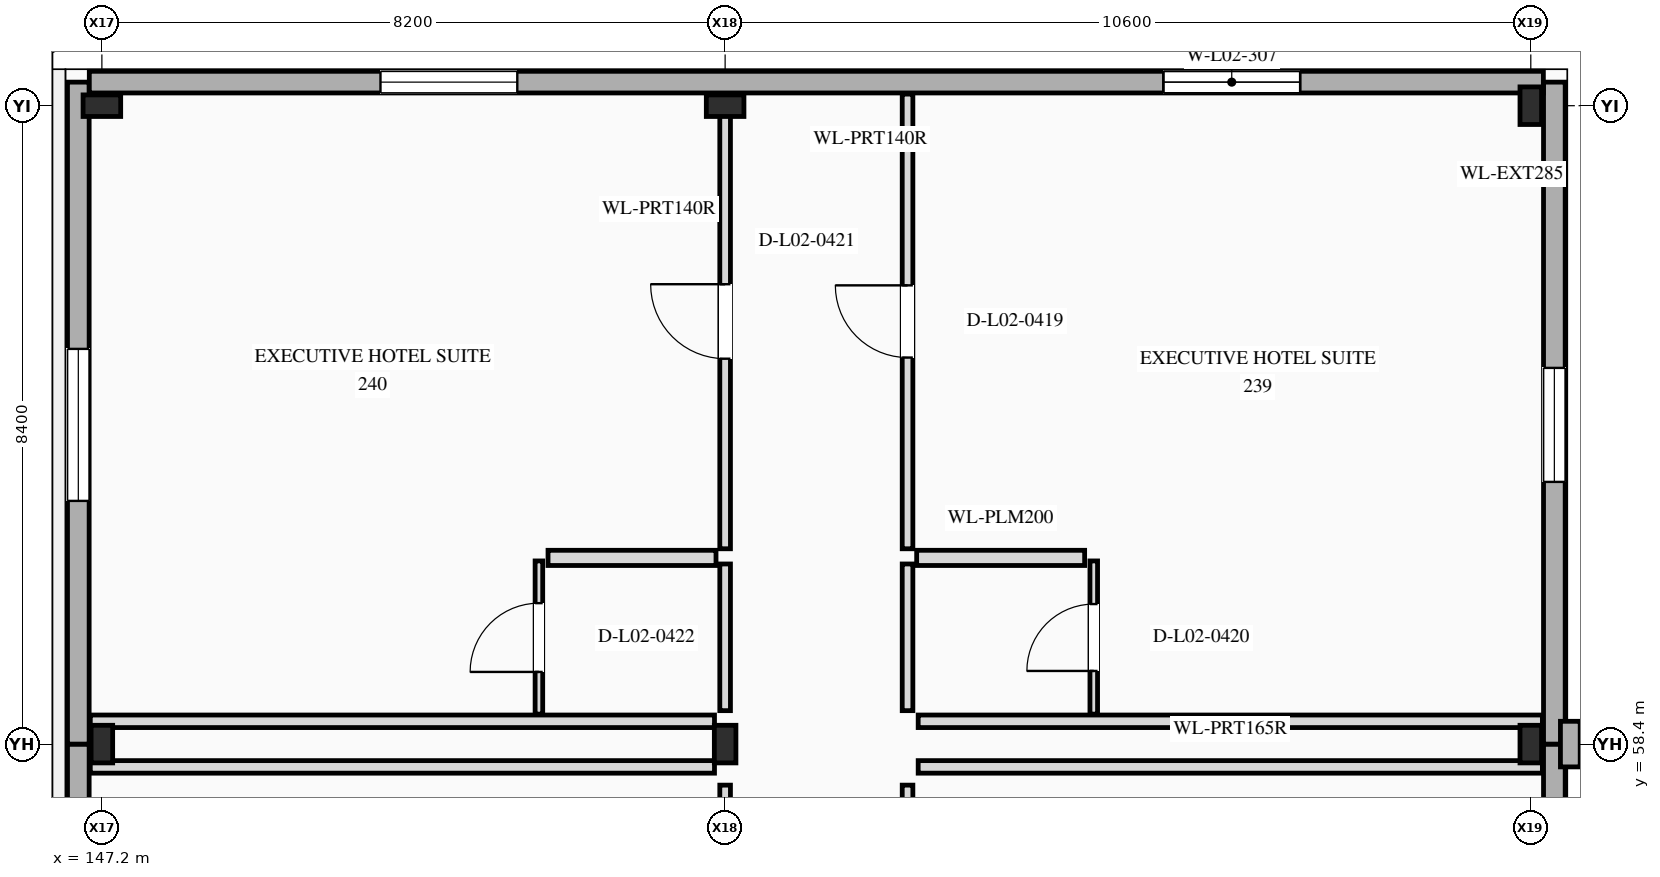
"""IFC4 building model, lengths in metres.
Left out: names, types, materials, properties, quantities, classifications, styles, units other than length and angle.
Written with IfcOpenShell. Run it as: python <this file> out.ifc"""

import sys

from ifc_helpers import new_model, si_unit, direction, frame, frame_2d, origin, origin_2d, place, context, subcontext, project, spatial, rectangle, i_section, extrude, element, fill, save


model = new_model("IFC4")
c1 = context("Model", 3, precision=1e-05, world=origin(), true_north=direction((0.0, 1.0)))
c2 = subcontext(c1, "Body", "Model", "MODEL_VIEW")
j1 = project(units=[si_unit("LENGTHUNIT", "METRE"), si_unit("PLANEANGLEUNIT", "RADIAN")], contexts=[c1])
p1 = place(None, origin())
s1 = spatial("IfcSite", under=j1, at=p1, CompositionType="ELEMENT")
p2 = place(p1, origin())
s2 = spatial("IfcBuilding", under=s1, at=p2, CompositionType="ELEMENT")
p3 = place(p2, frame((0.0, 0.0, 10.8)))
s3 = spatial("IfcBuildingStorey", under=s2, at=p3, CompositionType="ELEMENT", Elevation=10.8)
for number, where, z_axis, x_axis in (
    (1, (147.2, 58.4, 0.0), (0.0, 0.0, 1.0), (1.0, 0.0, 0.0)),
    (2, (147.2, 66.8, 0.0), (0.0, 0.0, 1.0), (0.0, 1.0, 0.0)),
    (3, (155.4, 58.4, 0.0), (0.0, 0.0, 1.0), (1.0, 0.0, 0.0)),
    (4, (155.4, 66.8, 0.0), (0.0, 0.0, 1.0), (0.0, 1.0, 0.0)),
    (5, (166.0, 58.4, 0.0), (0.0, 0.0, 1.0), (1.0, 0.0, 0.0)),
    (6, (166.0, 66.8, 0.0), (0.0, 0.0, 1.0), (1.0, 0.0, 0.0)),
):
    element("IfcColumn", number, at=place(p3, frame(where, z_axis=z_axis, x_axis=x_axis)), inside=s3, PredefinedType="COLUMN", context=c2, shape_type="SweptSolid", body=[
        extrude(i_section(OverallWidth=0.284, OverallDepth=0.495, WebThickness=0.019, FlangeThickness=0.033, at=origin_2d()), origin(), (0.0, 0.0, 1.0), 4.8),
    ])
p4 = place(p3, frame((166.31, 50.0, 0.0), z_axis=(0.0, 0.0, 1.0), x_axis=(0.0, 1.0, 0.0)))
e7 = element("IfcWall", 7, at=p4, inside=s3, PredefinedType="STANDARD", context=c2, shape_type="SweptSolid", body=[
    extrude(rectangle(XDim=8.4, YDim=0.285, at=frame_2d((4.2, 0.0))), origin(), (0.0, 0.0, 1.0), 4.8),
])
p5 = place(p4, frame((3.2, 0.0, 0.85)))
e8 = element("IfcOpeningElement", 8, at=p5, cuts=e7, PredefinedType="OPENING", context=c2, shape_type="SweptSolid", body=[
    extrude(rectangle(XDim=2.0, YDim=1.65, at=frame_2d((1.0, 0.825))), frame((0.0, 0.152, 0.0), z_axis=(0.0, -1.0, 0.0), x_axis=(1.0, 0.0, 0.0)), (0.0, 0.0, 1.0), 0.305),
])
p6 = place(p3, frame((166.31, 58.4, 0.0), z_axis=(0.0, 0.0, 1.0), x_axis=(0.0, 1.0, 0.0)))
e9 = element("IfcWall", 9, at=p6, inside=s3, PredefinedType="STANDARD", context=c2, shape_type="SweptSolid", body=[
    extrude(rectangle(XDim=8.71, YDim=0.285, at=frame_2d((4.355, 0.0))), origin(), (0.0, 0.0, 1.0), 4.8),
])
p7 = place(p6, frame((3.45, 0.0, 0.85)))
e10 = element("IfcOpeningElement", 10, at=p7, cuts=e9, PredefinedType="OPENING", context=c2, shape_type="SweptSolid", body=[
    extrude(rectangle(XDim=1.5, YDim=1.7, at=frame_2d((0.75, 0.85))), frame((0.0, 0.152, 0.0), z_axis=(0.0, -1.0, 0.0), x_axis=(1.0, 0.0, 0.0)), (0.0, 0.0, 1.0), 0.305),
])
p8 = place(p3, frame((166.52, 58.1, 0.0), z_axis=(0.0, 0.0, 1.0), x_axis=(0.0, 1.0, 0.0)))
e11 = element("IfcWall", 11, at=p8, inside=s3, PredefinedType="ELEMENTEDWALL", context=c2, shape_type="SweptSolid", body=[
    extrude(rectangle(XDim=0.6, YDim=0.26, at=frame_2d((0.3, 0.0))), origin(), (0.0, 0.0, 1.0), 4.8),
])
p9 = place(p3, frame((146.89, 50.0, 0.0), z_axis=(0.0, 0.0, 1.0), x_axis=(0.0, 1.0, 0.0)))
e12 = element("IfcWall", 12, at=p9, inside=s3, PredefinedType="STANDARD", context=c2, shape_type="SweptSolid", body=[
    extrude(rectangle(XDim=8.4, YDim=0.285, at=frame_2d((4.2, 0.0))), origin(), (0.0, 0.0, 1.0), 4.8),
])
p10 = place(p9, frame((3.225, 0.0, 0.85)))
e13 = element("IfcOpeningElement", 13, at=p10, cuts=e12, PredefinedType="OPENING", context=c2, shape_type="SweptSolid", body=[
    extrude(rectangle(XDim=1.95, YDim=1.85, at=frame_2d((0.975, 0.925))), frame((0.0, 0.152, 0.0), z_axis=(0.0, -1.0, 0.0), x_axis=(1.0, 0.0, 0.0)), (0.0, 0.0, 1.0), 0.305),
])
p11 = place(p3, frame((146.89, 58.4, 0.0), z_axis=(0.0, 0.0, 1.0), x_axis=(0.0, 1.0, 0.0)))
e14 = element("IfcWall", 14, at=p11, inside=s3, PredefinedType="STANDARD", context=c2, shape_type="SweptSolid", body=[
    extrude(rectangle(XDim=8.71, YDim=0.285, at=frame_2d((4.355, 0.0))), origin(), (0.0, 0.0, 1.0), 4.8),
])
p12 = place(p11, frame((3.2, 0.0, 0.85)))
e15 = element("IfcOpeningElement", 15, at=p12, cuts=e14, PredefinedType="OPENING", context=c2, shape_type="SweptSolid", body=[
    extrude(rectangle(XDim=2.0, YDim=1.65, at=frame_2d((1.0, 0.825))), frame((0.0, 0.152, 0.0), z_axis=(0.0, -1.0, 0.0), x_axis=(1.0, 0.0, 0.0)), (0.0, 0.0, 1.0), 0.305),
])
p13 = place(p3, frame((166.166, 67.11, 0.0), z_axis=(0.0, 0.0, 1.0), x_axis=(-1.0, 0.0, 0.0)))
e16 = element("IfcWall", 16, at=p13, inside=s3, PredefinedType="STANDARD", context=c2, shape_type="SweptSolid", body=[
    extrude(rectangle(XDim=19.131, YDim=0.285, at=frame_2d((9.565, 0.0))), origin(), (0.0, 0.0, 1.0), 4.8),
])
p14 = place(p13, frame((3.2, 0.0, 0.88)))
e17 = element("IfcOpeningElement", 17, at=p14, cuts=e16, PredefinedType="OPENING", context=c2, shape_type="SweptSolid", body=[
    extrude(rectangle(XDim=1.8, YDim=1.8, at=frame_2d((0.9, 0.9))), frame((0.0, 0.152, 0.0), z_axis=(0.0, -1.0, 0.0), x_axis=(1.0, 0.0, 0.0)), (0.0, 0.0, 1.0), 0.305),
])
p15 = place(p13, frame((13.5, 0.0, 0.88)))
e18 = element("IfcOpeningElement", 18, at=p15, cuts=e16, PredefinedType="OPENING", context=c2, shape_type="SweptSolid", body=[
    extrude(rectangle(XDim=1.8, YDim=1.8, at=frame_2d((0.9, 0.9))), frame((0.0, 0.152, 0.0), z_axis=(0.0, -1.0, 0.0), x_axis=(1.0, 0.0, 0.0)), (0.0, 0.0, 1.0), 0.305),
])
p16 = place(p3, frame((157.8, 52.57, 0.0), z_axis=(0.0, 0.0, 1.0), x_axis=(0.0, 1.0, 0.0)))
e19 = element("IfcWall", 19, at=p16, inside=s3, PredefinedType="PARTITIONING", context=c2, shape_type="SweptSolid", body=[
    extrude(rectangle(XDim=5.29, YDim=0.14, at=frame_2d((2.645, 0.0))), origin(), (0.0, 0.0, 1.0), 4.475),
])
p17 = place(p16, frame((2.11, 0.0, 0.0)))
e20 = element("IfcOpeningElement", 20, at=p17, cuts=e19, PredefinedType="OPENING", context=c2, shape_type="SweptSolid", body=[
    extrude(rectangle(XDim=1.07, YDim=2.25, at=frame_2d((0.535, 1.125))), frame((0.0, 0.08, 0.0), z_axis=(0.0, -1.0, 0.0), x_axis=(1.0, 0.0, 0.0)), (0.0, 0.0, 1.0), 0.16),
])
p18 = place(p3, frame((157.94, 58.1, 0.0), z_axis=(0.0, 0.0, 1.0), x_axis=(1.0, 0.0, 0.0)))
e21 = element("IfcWall", 21, at=p18, inside=s3, PredefinedType="PARTITIONING", context=c2, shape_type="SweptSolid", body=[
    extrude(rectangle(XDim=8.213, YDim=0.165, at=frame_2d((4.106, 0.0))), origin(), (0.0, 0.0, 1.0), 3.865),
])
p19 = place(p3, frame((155.4, 52.57, 0.0), z_axis=(0.0, 0.0, 1.0), x_axis=(0.0, 1.0, 0.0)))
e22 = element("IfcWall", 22, at=p19, inside=s3, PredefinedType="PARTITIONING", context=c2, shape_type="SweptSolid", body=[
    extrude(rectangle(XDim=5.29, YDim=0.14, at=frame_2d((2.645, 0.0))), origin(), (0.0, 0.0, 1.0), 3.865),
])
p20 = place(p19, frame((2.185, 0.0, 0.0)))
e23 = element("IfcOpeningElement", 23, at=p20, cuts=e22, PredefinedType="OPENING", context=c2, shape_type="SweptSolid", body=[
    extrude(rectangle(XDim=0.92, YDim=2.3, at=frame_2d((0.46, 1.15))), frame((0.0, 0.08, 0.0), z_axis=(0.0, -1.0, 0.0), x_axis=(1.0, 0.0, 0.0)), (0.0, 0.0, 1.0), 0.16),
])
p21 = place(p3, frame((147.048, 58.1, 0.0), z_axis=(0.0, 0.0, 1.0), x_axis=(1.0, 0.0, 0.0)))
e24 = element("IfcWall", 24, at=p21, inside=s3, PredefinedType="PARTITIONING", context=c2, shape_type="SweptSolid", body=[
    extrude(rectangle(XDim=8.212, YDim=0.165, at=frame_2d((4.106, 0.0))), origin(), (0.0, 0.0, 1.0), 3.888),
])
p22 = place(p3, frame((157.8, 58.84, 0.0), z_axis=(0.0, 0.0, 1.0), x_axis=(0.0, 1.0, 0.0)))
e25 = element("IfcWall", 25, at=p22, inside=s3, PredefinedType="PARTITIONING", context=c2, shape_type="SweptSolid", body=[
    extrude(rectangle(XDim=1.93, YDim=0.14, at=frame_2d((0.965, 0.0))), origin(), (0.0, 0.0, 1.0), 4.033),
])
p23 = place(p3, frame((157.8, 60.97, 0.0), z_axis=(0.0, 0.0, 1.0), x_axis=(0.0, 1.0, 0.0)))
e26 = element("IfcWall", 26, at=p23, inside=s3, PredefinedType="PARTITIONING", context=c2, shape_type="SweptSolid", body=[
    extrude(rectangle(XDim=5.982, YDim=0.14, at=frame_2d((2.991, 0.0))), origin(), (0.0, 0.0, 1.0), 3.888),
])
p24 = place(p23, frame((2.516, 0.0, 0.0)))
e27 = element("IfcOpeningElement", 27, at=p24, cuts=e26, PredefinedType="OPENING", context=c2, shape_type="SweptSolid", body=[
    extrude(rectangle(XDim=0.95, YDim=2.3, at=frame_2d((0.475, 1.15))), frame((0.0, 0.08, 0.0), z_axis=(0.0, -1.0, 0.0), x_axis=(1.0, 0.0, 0.0)), (0.0, 0.0, 1.0), 0.16),
])
p25 = place(p3, frame((157.94, 58.7, 0.0), z_axis=(0.0, 0.0, 1.0), x_axis=(1.0, 0.0, 0.0)))
e28 = element("IfcWall", 28, at=p25, inside=s3, PredefinedType="PARTITIONING", context=c2, shape_type="SweptSolid", body=[
    extrude(rectangle(XDim=8.213, YDim=0.165, at=frame_2d((4.106, 0.0))), origin(), (0.0, 0.0, 1.0), 3.865),
])
p26 = place(p3, frame((157.92, 60.85, 0.0), z_axis=(0.0, 0.0, 1.0), x_axis=(1.0, 0.0, 0.0)))
e29 = element("IfcWall", 29, at=p26, inside=s3, PredefinedType="PLUMBINGWALL", context=c2, shape_type="SweptSolid", body=[
    extrude(rectangle(XDim=2.21, YDim=0.2, at=frame_2d((1.105, 0.0))), origin(), (0.0, 0.0, 1.0), 4.475),
])
p27 = place(p3, frame((160.25, 58.794, 0.0), z_axis=(0.0, 0.0, 1.0), x_axis=(0.0, 1.0, 0.0)))
e30 = element("IfcWall", 30, at=p27, inside=s3, PredefinedType="PARTITIONING", context=c2, shape_type="SweptSolid", body=[
    extrude(rectangle(XDim=2.016, YDim=0.1, at=frame_2d((1.008, 0.0))), origin(), (0.0, 0.0, 1.0), 4.033),
])
p28 = place(p27, frame((0.568, 0.0, 0.0)))
e31 = element("IfcOpeningElement", 31, at=p28, cuts=e30, PredefinedType="OPENING", context=c2, shape_type="SweptSolid", body=[
    extrude(rectangle(XDim=0.88, YDim=2.1, at=frame_2d((0.44, 1.05))), frame((0.0, 0.06, 0.0), z_axis=(0.0, -1.0, 0.0), x_axis=(1.0, 0.0, 0.0)), (0.0, 0.0, 1.0), 0.12),
])
p29 = place(p3, frame((155.4, 58.84, 0.0), z_axis=(0.0, 0.0, 1.0), x_axis=(0.0, 1.0, 0.0)))
e32 = element("IfcWall", 32, at=p29, inside=s3, PredefinedType="PARTITIONING", context=c2, shape_type="SweptSolid", body=[
    extrude(rectangle(XDim=1.93, YDim=0.14, at=frame_2d((0.965, 0.0))), origin(), (0.0, 0.0, 1.0), 3.949),
])
p30 = place(p3, frame((155.4, 60.97, 0.0), z_axis=(0.0, 0.0, 1.0), x_axis=(0.0, 1.0, 0.0)))
e33 = element("IfcWall", 33, at=p30, inside=s3, PredefinedType="PARTITIONING", context=c2, shape_type="SweptSolid", body=[
    extrude(rectangle(XDim=5.982, YDim=0.14, at=frame_2d((2.991, 0.0))), origin(), (0.0, 0.0, 1.0), 3.888),
])
p31 = place(p30, frame((2.501, 0.0, 0.0)))
e34 = element("IfcOpeningElement", 34, at=p31, cuts=e33, PredefinedType="OPENING", context=c2, shape_type="SweptSolid", body=[
    extrude(rectangle(XDim=0.98, YDim=2.35, at=frame_2d((0.49, 1.175))), frame((0.0, 0.08, 0.0), z_axis=(0.0, -1.0, 0.0), x_axis=(1.0, 0.0, 0.0)), (0.0, 0.0, 1.0), 0.16),
])
p32 = place(p3, frame((147.048, 58.7, 0.0), z_axis=(0.0, 0.0, 1.0), x_axis=(1.0, 0.0, 0.0)))
e35 = element("IfcWall", 35, at=p32, inside=s3, PredefinedType="PARTITIONING", context=c2, shape_type="SweptSolid", body=[
    extrude(rectangle(XDim=8.212, YDim=0.165, at=frame_2d((4.106, 0.0))), origin(), (0.0, 0.0, 1.0), 3.888),
])
p33 = place(p3, frame((153.07, 60.85, 0.0), z_axis=(0.0, 0.0, 1.0), x_axis=(1.0, 0.0, 0.0)))
e36 = element("IfcWall", 36, at=p33, inside=s3, PredefinedType="PLUMBINGWALL", context=c2, shape_type="SweptSolid", body=[
    extrude(rectangle(XDim=2.21, YDim=0.2, at=frame_2d((1.105, 0.0))), origin(), (0.0, 0.0, 1.0), 4.475),
])
p34 = place(p3, frame((152.95, 58.794, 0.0), z_axis=(0.0, 0.0, 1.0), x_axis=(0.0, 1.0, 0.0)))
e37 = element("IfcWall", 37, at=p34, inside=s3, PredefinedType="PARTITIONING", context=c2, shape_type="SweptSolid", body=[
    extrude(rectangle(XDim=2.016, YDim=0.1, at=frame_2d((1.008, 0.0))), origin(), (0.0, 0.0, 1.0), 4.083),
])
p35 = place(p34, frame((0.555, 0.0, 0.0)))
e38 = element("IfcOpeningElement", 38, at=p35, cuts=e37, PredefinedType="OPENING", context=c2, shape_type="SweptSolid", body=[
    extrude(rectangle(XDim=0.905, YDim=2.1, at=frame_2d((0.453, 1.05))), frame((0.0, 0.06, 0.0), z_axis=(0.0, -1.0, 0.0), x_axis=(1.0, 0.0, 0.0)), (0.0, 0.0, 1.0), 0.12),
])
p36 = place(p7, origin())
e39 = element("IfcWindow", 39, at=p36, inside=s3, PartitioningType="SINGLE_PANEL", PredefinedType="WINDOW", context=c2, shape_type="SweptSolid", body=[
    extrude(rectangle(XDim=1.5, YDim=1.7, at=frame_2d((0.75, 0.85))), frame((0.0, 0.03, 0.0), z_axis=(0.0, -1.0, 0.0), x_axis=(1.0, 0.0, 0.0)), (0.0, 0.0, 1.0), 0.06),
])
fill(e10, e39)
p37 = place(p12, origin())
e40 = element("IfcWindow", 40, at=p37, inside=s3, PartitioningType="SINGLE_PANEL", PredefinedType="WINDOW", context=c2, shape_type="SweptSolid", body=[
    extrude(rectangle(XDim=2.0, YDim=1.65, at=frame_2d((1.0, 0.825))), frame((0.0, 0.03, 0.0), z_axis=(0.0, -1.0, 0.0), x_axis=(1.0, 0.0, 0.0)), (0.0, 0.0, 1.0), 0.06),
])
fill(e15, e40)
p38 = place(p14, origin())
e41 = element("IfcWindow", 41, at=p38, inside=s3, PartitioningType="SINGLE_PANEL", PredefinedType="WINDOW", context=c2, shape_type="SweptSolid", body=[
    extrude(rectangle(XDim=1.8, YDim=1.8, at=frame_2d((0.9, 0.9))), frame((0.0, 0.03, 0.0), z_axis=(0.0, -1.0, 0.0), x_axis=(1.0, 0.0, 0.0)), (0.0, 0.0, 1.0), 0.06),
])
fill(e17, e41)
p39 = place(p15, origin())
e42 = element("IfcWindow", 42, at=p39, inside=s3, PartitioningType="SINGLE_PANEL", PredefinedType="WINDOW", context=c2, shape_type="SweptSolid", body=[
    extrude(rectangle(XDim=1.8, YDim=1.8, at=frame_2d((0.9, 0.9))), frame((0.0, 0.03, 0.0), z_axis=(0.0, -1.0, 0.0), x_axis=(1.0, 0.0, 0.0)), (0.0, 0.0, 1.0), 0.06),
])
fill(e18, e42)
p40 = place(p24, origin())
e43 = element("IfcDoor", 43, at=p40, inside=s3, OperationType="SINGLE_SWING_RIGHT", PredefinedType="DOOR", context=c2, shape_type="SweptSolid", body=[
    extrude(rectangle(XDim=0.95, YDim=2.3, at=frame_2d((0.475, 1.15))), frame((0.0, 0.025, 0.0), z_axis=(0.0, -1.0, 0.0), x_axis=(1.0, 0.0, 0.0)), (0.0, 0.0, 1.0), 0.05),
])
fill(e27, e43)
p41 = place(p28, origin())
e44 = element("IfcDoor", 44, at=p41, inside=s3, OperationType="SINGLE_SWING_LEFT", PredefinedType="DOOR", context=c2, shape_type="SweptSolid", body=[
    extrude(rectangle(XDim=0.88, YDim=2.1, at=frame_2d((0.44, 1.05))), frame((0.0, 0.025, 0.0), z_axis=(0.0, -1.0, 0.0), x_axis=(1.0, 0.0, 0.0)), (0.0, 0.0, 1.0), 0.05),
])
fill(e31, e44)
p42 = place(p31, origin())
e45 = element("IfcDoor", 45, at=p42, inside=s3, OperationType="SINGLE_SWING_RIGHT", PredefinedType="DOOR", context=c2, shape_type="SweptSolid", body=[
    extrude(rectangle(XDim=0.98, YDim=2.35, at=frame_2d((0.49, 1.175))), frame((0.0, 0.025, 0.0), z_axis=(0.0, -1.0, 0.0), x_axis=(1.0, 0.0, 0.0)), (0.0, 0.0, 1.0), 0.05),
])
fill(e34, e45)
p43 = place(p35, origin())
e46 = element("IfcDoor", 46, at=p43, inside=s3, OperationType="SINGLE_SWING_LEFT", PredefinedType="DOOR", context=c2, shape_type="SweptSolid", body=[
    extrude(rectangle(XDim=0.905, YDim=2.1, at=frame_2d((0.453, 1.05))), frame((0.0, 0.025, 0.0), z_axis=(0.0, -1.0, 0.0), x_axis=(1.0, 0.0, 0.0)), (0.0, 0.0, 1.0), 0.05),
])
fill(e38, e46)
save(model, sys.argv[1])
